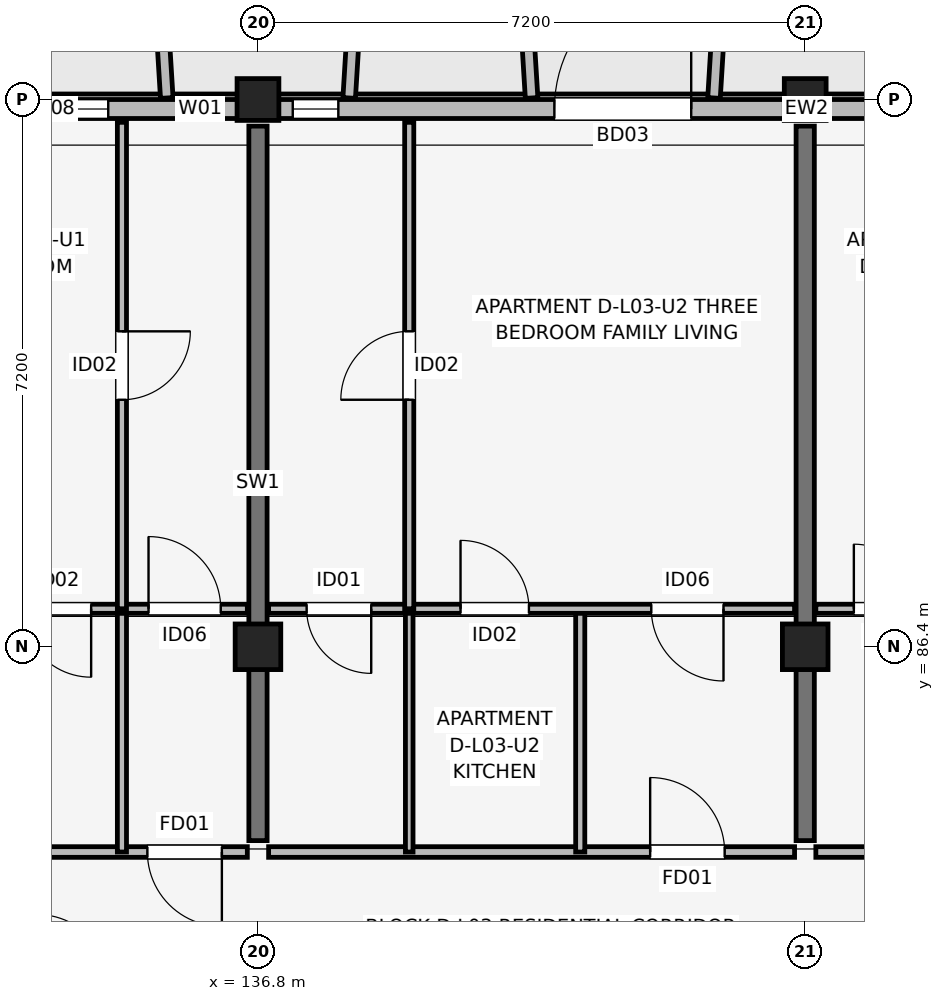
"""IFC4 building model, lengths in metres.
Left out: names, types, materials, properties, quantities, classifications, styles, units other than length and angle.
Written with IfcOpenShell. Run it as: python <this file> out.ifc"""

import sys

from ifc_helpers import new_model, si_unit, direction, frame, frame_2d, origin, origin_2d, place, context, subcontext, project, spatial, rectangle, extrude, element, fill, save


model = new_model("IFC4")
c1 = context("Model", 3, precision=1e-05, world=origin(), true_north=direction((0.0, 1.0)))
c2 = subcontext(c1, "Body", "Model", "MODEL_VIEW")
j1 = project(units=[si_unit("LENGTHUNIT", "METRE"), si_unit("PLANEANGLEUNIT", "RADIAN")], contexts=[c1])
p1 = place(None, origin())
s1 = spatial("IfcSite", under=j1, at=p1, CompositionType="ELEMENT")
p2 = place(p1, origin())
s2 = spatial("IfcBuilding", under=s1, at=p2, CompositionType="ELEMENT")
p3 = place(p2, frame((0.0, 0.0, 11.85)))
s3 = spatial("IfcBuildingStorey", under=s2, at=p3, CompositionType="ELEMENT", Elevation=11.85)
p4 = place(p3, frame((136.8, 86.4, 0.0), z_axis=(0.0, 0.0, 1.0), x_axis=(1.0, 0.0, 0.0)))
e1 = element("IfcColumn", 1, at=p4, inside=s3, PredefinedType="COLUMN", context=c2, shape_type="SweptSolid", body=[
    extrude(rectangle(XDim=0.6, YDim=0.6, at=origin_2d()), origin(), (0.0, 0.0, 1.0), 3.15),
])
p5 = place(p3, frame((136.8, 93.6, 0.0), z_axis=(0.0, 0.0, 1.0), x_axis=(1.0, 0.0, 0.0)))
e2 = element("IfcColumn", 2, at=p5, inside=s3, PredefinedType="COLUMN", context=c2, shape_type="SweptSolid", body=[
    extrude(rectangle(XDim=0.55, YDim=0.55, at=origin_2d()), origin(), (0.0, 0.0, 1.0), 3.15),
])
p6 = place(p3, frame((144.0, 86.4, 0.0), z_axis=(0.0, 0.0, 1.0), x_axis=(1.0, 0.0, 0.0)))
e3 = element("IfcColumn", 3, at=p6, inside=s3, PredefinedType="COLUMN", context=c2, shape_type="SweptSolid", body=[
    extrude(rectangle(XDim=0.6, YDim=0.6, at=origin_2d()), origin(), (0.0, 0.0, 1.0), 3.15),
])
p7 = place(p3, frame((144.0, 93.6, 0.0), z_axis=(0.0, 0.0, 1.0), x_axis=(1.0, 0.0, 0.0)))
e4 = element("IfcColumn", 4, at=p7, inside=s3, PredefinedType="COLUMN", context=c2, shape_type="SweptSolid", body=[
    extrude(rectangle(XDim=0.55, YDim=0.55, at=origin_2d()), origin(), (0.0, 0.0, 1.0), 3.15),
])
for number, where, z_axis, x_axis in (
    (5, (136.8, 83.85, 0.0), (0.0, 0.0, 1.0), (0.0, 1.0, 0.0)),
    (6, (144.0, 83.85, 0.0), (0.0, 0.0, 1.0), (0.0, 1.0, 0.0)),
):
    element("IfcWall", number, at=place(p3, frame(where, z_axis=z_axis, x_axis=x_axis)), inside=s3, PredefinedType="SHEAR", context=c2, shape_type="SweptSolid", body=[
        extrude(rectangle(XDim=9.4, YDim=0.24, at=frame_2d((4.7, 0.0))), origin(), (0.0, 0.0, 1.0), 3.15),
    ])
p8 = place(p3, frame((162.8, 93.475, 0.0), z_axis=(0.0, 0.0, 1.0), x_axis=(-1.0, 0.0, 0.0)))
e7 = element("IfcWall", 7, at=p8, inside=s3, PredefinedType="SOLIDWALL", context=c2, shape_type="SweptSolid", body=[
    extrude(rectangle(XDim=30.4, YDim=0.25, at=frame_2d((15.2, 0.0))), origin(), (0.0, 0.0, 1.0), 2.43),
])
p9 = place(p8, frame((22.1, 0.0, 0.0), z_axis=(0.0, 0.0, 1.0), x_axis=(-1.0, 0.0, 0.0)))
e8 = element("IfcOpeningElement", 8, at=p9, cuts=e7, PredefinedType="OPENING", context=c2, shape_type="SweptSolid", body=[
    extrude(rectangle(XDim=1.8, YDim=2.15, at=frame_2d((0.9, 1.075))), frame((0.0, 0.135, 0.0), z_axis=(0.0, -1.0, 0.0), x_axis=(1.0, 0.0, 0.0)), (0.0, 0.0, 1.0), 0.27),
])
p10 = place(p8, frame((7.625, 0.0, 0.0), z_axis=(0.0, 0.0, 1.0), x_axis=(-1.0, 0.0, 0.0)))
e9 = element("IfcOpeningElement", 9, at=p10, cuts=e7, PredefinedType="OPENING", context=c2, shape_type="SweptSolid", body=[
    extrude(rectangle(XDim=1.65, YDim=2.15, at=frame_2d((0.825, 1.075))), frame((0.0, 0.135, 0.0), z_axis=(0.0, -1.0, 0.0), x_axis=(1.0, 0.0, 0.0)), (0.0, 0.0, 1.0), 0.27),
])
p11 = place(p8, frame((27.97, 0.0, 0.7)))
e10 = element("IfcOpeningElement", 10, at=p11, cuts=e7, PredefinedType="OPENING", context=c2, shape_type="SweptSolid", body=[
    extrude(rectangle(XDim=1.46, YDim=1.55, at=frame_2d((0.73, 0.775))), frame((0.0, 0.135, 0.0), z_axis=(0.0, -1.0, 0.0), x_axis=(1.0, 0.0, 0.0)), (0.0, 0.0, 1.0), 0.27),
])
p12 = place(p8, frame((26.458, 0.0, 0.75)))
e11 = element("IfcOpeningElement", 11, at=p12, cuts=e7, PredefinedType="OPENING", context=c2, shape_type="SweptSolid", body=[
    extrude(rectangle(XDim=0.6, YDim=1.25, at=frame_2d((0.3, 0.625))), frame((0.0, 0.135, 0.0), z_axis=(0.0, -1.0, 0.0), x_axis=(1.0, 0.0, 0.0)), (0.0, 0.0, 1.0), 0.27),
])
p13 = place(p8, frame((24.942, 0.0, 0.75)))
e12 = element("IfcOpeningElement", 12, at=p13, cuts=e7, PredefinedType="OPENING", context=c2, shape_type="SweptSolid", body=[
    extrude(rectangle(XDim=0.6, YDim=1.25, at=frame_2d((0.3, 0.625))), frame((0.0, 0.135, 0.0), z_axis=(0.0, -1.0, 0.0), x_axis=(1.0, 0.0, 0.0)), (0.0, 0.0, 1.0), 0.27),
])
p14 = place(p8, frame((15.54, 0.0, 0.7)))
e13 = element("IfcOpeningElement", 13, at=p14, cuts=e7, PredefinedType="OPENING", context=c2, shape_type="SweptSolid", body=[
    extrude(rectangle(XDim=1.72, YDim=1.6, at=frame_2d((0.86, 0.8))), frame((0.0, 0.135, 0.0), z_axis=(0.0, -1.0, 0.0), x_axis=(1.0, 0.0, 0.0)), (0.0, 0.0, 1.0), 0.27),
])
p15 = place(p8, frame((13.465, 0.0, 0.75)))
e14 = element("IfcOpeningElement", 14, at=p15, cuts=e7, PredefinedType="OPENING", context=c2, shape_type="SweptSolid", body=[
    extrude(rectangle(XDim=0.72, YDim=1.35, at=frame_2d((0.36, 0.675))), frame((0.0, 0.135, 0.0), z_axis=(0.0, -1.0, 0.0), x_axis=(1.0, 0.0, 0.0)), (0.0, 0.0, 1.0), 0.27),
])
p16 = place(p8, frame((10.542, 0.0, 0.75)))
e15 = element("IfcOpeningElement", 15, at=p16, cuts=e7, PredefinedType="OPENING", context=c2, shape_type="SweptSolid", body=[
    extrude(rectangle(XDim=0.6, YDim=1.25, at=frame_2d((0.3, 0.625))), frame((0.0, 0.135, 0.0), z_axis=(0.0, -1.0, 0.0), x_axis=(1.0, 0.0, 0.0)), (0.0, 0.0, 1.0), 0.27),
])
p17 = place(p8, frame((3.343, 0.0, 0.75)))
e16 = element("IfcOpeningElement", 16, at=p17, cuts=e7, PredefinedType="OPENING", context=c2, shape_type="SweptSolid", body=[
    extrude(rectangle(XDim=0.6, YDim=1.25, at=frame_2d((0.3, 0.625))), frame((0.0, 0.135, 0.0), z_axis=(0.0, -1.0, 0.0), x_axis=(1.0, 0.0, 0.0)), (0.0, 0.0, 1.0), 0.27),
])
p18 = place(p8, frame((1.02, 0.0, 0.75)))
e17 = element("IfcOpeningElement", 17, at=p18, cuts=e7, PredefinedType="OPENING", context=c2, shape_type="SweptSolid", body=[
    extrude(rectangle(XDim=1.1, YDim=1.5, at=frame_2d((0.55, 0.75))), frame((0.0, 0.135, 0.0), z_axis=(0.0, -1.0, 0.0), x_axis=(1.0, 0.0, 0.0)), (0.0, 0.0, 1.0), 0.27),
])
p19 = place(p3, frame((135.6, 93.62, 0.0), z_axis=(0.0, 0.0, 1.0), x_axis=(-0.061170732449, 0.998127317276, 0.0)))
e18 = element("IfcWall", 18, at=p19, inside=s3, PredefinedType="ELEMENTEDWALL", context=c2, shape_type="SweptSolid", body=[
    extrude(rectangle(XDim=1.964, YDim=0.165, at=frame_2d((0.982, 0.0))), origin(), (0.0, 0.0, 1.0), 2.95),
])
for number, where, z_axis, x_axis in (
    (19, (138.0, 93.62, 0.0), (0.0, 0.0, 1.0), (0.061, 0.998, 0.0)),
    (20, (140.4, 93.62, 0.0), (0.0, 0.0, 1.0), (-0.061, 0.998, 0.0)),
    (21, (142.8, 93.62, 0.0), (0.0, 0.0, 1.0), (0.061, 0.998, 0.0)),
):
    element("IfcWall", number, at=place(p3, frame(where, z_axis=z_axis, x_axis=x_axis)), inside=s3, PredefinedType="ELEMENTEDWALL", context=c2, shape_type="SweptSolid", body=[
        extrude(rectangle(XDim=1.964, YDim=0.165, at=frame_2d((0.982, 0.0))), origin(), (0.0, 0.0, 1.0), 2.48),
    ])
p20 = place(p3, frame((129.74, 83.7, 0.0), z_axis=(0.0, 0.0, 1.0), x_axis=(1.0, 0.0, 0.0)))
e22 = element("IfcWall", 22, at=p20, inside=s3, PredefinedType="PARTITIONING", context=c2, shape_type="SweptSolid", body=[
    extrude(rectangle(XDim=6.92, YDim=0.14, at=frame_2d((3.46, 0.0))), origin(), (0.0, 0.0, 1.0), 2.38),
])
p21 = place(p20, frame((6.585, 0.0, 0.0), z_axis=(0.0, 0.0, 1.0), x_axis=(-1.0, 0.0, 0.0)))
e23 = element("IfcOpeningElement", 23, at=p21, cuts=e22, PredefinedType="OPENING", context=c2, shape_type="SweptSolid", body=[
    extrude(rectangle(XDim=0.98, YDim=2.1, at=frame_2d((0.49, 1.05))), frame((0.0, 0.08, 0.0), z_axis=(0.0, -1.0, 0.0), x_axis=(1.0, 0.0, 0.0)), (0.0, 0.0, 1.0), 0.16),
])
p22 = place(p3, frame((135.01, 83.7, 0.0), z_axis=(0.0, 0.0, 1.0), x_axis=(0.0, 1.0, 0.0)))
e24 = element("IfcWall", 24, at=p22, inside=s3, PredefinedType="PARTITIONING", context=c2, shape_type="SweptSolid", body=[
    extrude(rectangle(XDim=3.2, YDim=0.12, at=frame_2d((1.6, 0.0))), origin(), (0.0, 0.0, 1.0), 2.375),
])
p23 = place(p3, frame((129.74, 86.9, 0.0), z_axis=(0.0, 0.0, 1.0), x_axis=(1.0, 0.0, 0.0)))
e25 = element("IfcWall", 25, at=p23, inside=s3, PredefinedType="PARTITIONING", context=c2, shape_type="SweptSolid", body=[
    extrude(rectangle(XDim=6.92, YDim=0.12, at=frame_2d((3.46, 0.0))), origin(), (0.0, 0.0, 1.0), 2.38),
])
p24 = place(p23, frame((2.21, 0.0, 0.0)))
e26 = element("IfcOpeningElement", 26, at=p24, cuts=e25, PredefinedType="OPENING", context=c2, shape_type="SweptSolid", body=[
    extrude(rectangle(XDim=0.85, YDim=2.08, at=frame_2d((0.425, 1.04))), frame((0.0, 0.07, 0.0), z_axis=(0.0, -1.0, 0.0), x_axis=(1.0, 0.0, 0.0)), (0.0, 0.0, 1.0), 0.14),
])
p25 = place(p23, frame((4.865, 0.0, 0.0), z_axis=(0.0, 0.0, 1.0), x_axis=(-1.0, 0.0, 0.0)))
e27 = element("IfcOpeningElement", 27, at=p25, cuts=e25, PredefinedType="OPENING", context=c2, shape_type="SweptSolid", body=[
    extrude(rectangle(XDim=0.9, YDim=2.08, at=frame_2d((0.45, 1.04))), frame((0.0, 0.07, 0.0), z_axis=(0.0, -1.0, 0.0), x_axis=(1.0, 0.0, 0.0)), (0.0, 0.0, 1.0), 0.14),
])
p26 = place(p23, frame((5.62, 0.0, 0.0)))
e28 = element("IfcOpeningElement", 28, at=p26, cuts=e25, PredefinedType="OPENING", context=c2, shape_type="SweptSolid", body=[
    extrude(rectangle(XDim=0.95, YDim=2.08, at=frame_2d((0.475, 1.04))), frame((0.0, 0.07, 0.0), z_axis=(0.0, -1.0, 0.0), x_axis=(1.0, 0.0, 0.0)), (0.0, 0.0, 1.0), 0.14),
])
p27 = place(p3, frame((135.01, 86.9, 0.0), z_axis=(0.0, 0.0, 1.0), x_axis=(0.0, 1.0, 0.0)))
e29 = element("IfcWall", 29, at=p27, inside=s3, PredefinedType="PARTITIONING", context=c2, shape_type="SweptSolid", body=[
    extrude(rectangle(XDim=6.4, YDim=0.12, at=frame_2d((3.2, 0.0))), origin(), (0.0, 0.0, 1.0), 2.38),
])
p28 = place(p27, frame((3.65, 0.0, 0.0), z_axis=(0.0, 0.0, 1.0), x_axis=(-1.0, 0.0, 0.0)))
e30 = element("IfcOpeningElement", 30, at=p28, cuts=e29, PredefinedType="OPENING", context=c2, shape_type="SweptSolid", body=[
    extrude(rectangle(XDim=0.9, YDim=2.08, at=frame_2d((0.45, 1.04))), frame((0.0, 0.07, 0.0), z_axis=(0.0, -1.0, 0.0), x_axis=(1.0, 0.0, 0.0)), (0.0, 0.0, 1.0), 0.14),
])
p29 = place(p3, frame((136.94, 83.7, 0.0), z_axis=(0.0, 0.0, 1.0), x_axis=(1.0, 0.0, 0.0)))
e31 = element("IfcWall", 31, at=p29, inside=s3, PredefinedType="PARTITIONING", context=c2, shape_type="SweptSolid", body=[
    extrude(rectangle(XDim=6.92, YDim=0.14, at=frame_2d((3.46, 0.0))), origin(), (0.0, 0.0, 1.0), 2.38),
])
p30 = place(p29, frame((5.02, 0.0, 0.0)))
e32 = element("IfcOpeningElement", 32, at=p30, cuts=e31, PredefinedType="OPENING", context=c2, shape_type="SweptSolid", body=[
    extrude(rectangle(XDim=0.98, YDim=2.1, at=frame_2d((0.49, 1.05))), frame((0.0, 0.08, 0.0), z_axis=(0.0, -1.0, 0.0), x_axis=(1.0, 0.0, 0.0)), (0.0, 0.0, 1.0), 0.16),
])
p31 = place(p3, frame((138.79, 83.7, 0.0), z_axis=(0.0, 0.0, 1.0), x_axis=(0.0, 1.0, 0.0)))
e33 = element("IfcWall", 33, at=p31, inside=s3, PredefinedType="PARTITIONING", context=c2, shape_type="SweptSolid", body=[
    extrude(rectangle(XDim=3.2, YDim=0.1, at=frame_2d((1.6, 0.0))), origin(), (0.0, 0.0, 1.0), 2.375),
])
p32 = place(p3, frame((141.04, 83.7, 0.0), z_axis=(0.0, 0.0, 1.0), x_axis=(0.0, 1.0, 0.0)))
e34 = element("IfcWall", 34, at=p32, inside=s3, PredefinedType="PARTITIONING", context=c2, shape_type="SweptSolid", body=[
    extrude(rectangle(XDim=3.2, YDim=0.12, at=frame_2d((1.6, 0.0))), origin(), (0.0, 0.0, 1.0), 2.375),
])
p33 = place(p3, frame((136.94, 86.9, 0.0), z_axis=(0.0, 0.0, 1.0), x_axis=(1.0, 0.0, 0.0)))
e35 = element("IfcWall", 35, at=p33, inside=s3, PredefinedType="PARTITIONING", context=c2, shape_type="SweptSolid", body=[
    extrude(rectangle(XDim=6.92, YDim=0.12, at=frame_2d((3.46, 0.0))), origin(), (0.0, 0.0, 1.0), 2.38),
])
p34 = place(p33, frame((1.35, 0.0, 0.0), z_axis=(0.0, 0.0, 1.0), x_axis=(-1.0, 0.0, 0.0)))
e36 = element("IfcOpeningElement", 36, at=p34, cuts=e35, PredefinedType="OPENING", context=c2, shape_type="SweptSolid", body=[
    extrude(rectangle(XDim=0.85, YDim=2.08, at=frame_2d((0.425, 1.04))), frame((0.0, 0.07, 0.0), z_axis=(0.0, -1.0, 0.0), x_axis=(1.0, 0.0, 0.0)), (0.0, 0.0, 1.0), 0.14),
])
p35 = place(p33, frame((2.525, 0.0, 0.0)))
e37 = element("IfcOpeningElement", 37, at=p35, cuts=e35, PredefinedType="OPENING", context=c2, shape_type="SweptSolid", body=[
    extrude(rectangle(XDim=0.9, YDim=2.08, at=frame_2d((0.45, 1.04))), frame((0.0, 0.07, 0.0), z_axis=(0.0, -1.0, 0.0), x_axis=(1.0, 0.0, 0.0)), (0.0, 0.0, 1.0), 0.14),
])
p36 = place(p33, frame((5.985, 0.0, 0.0), z_axis=(0.0, 0.0, 1.0), x_axis=(-1.0, 0.0, 0.0)))
e38 = element("IfcOpeningElement", 38, at=p36, cuts=e35, PredefinedType="OPENING", context=c2, shape_type="SweptSolid", body=[
    extrude(rectangle(XDim=0.95, YDim=2.08, at=frame_2d((0.475, 1.04))), frame((0.0, 0.07, 0.0), z_axis=(0.0, -1.0, 0.0), x_axis=(1.0, 0.0, 0.0)), (0.0, 0.0, 1.0), 0.14),
])
p37 = place(p3, frame((138.79, 86.9, 0.0), z_axis=(0.0, 0.0, 1.0), x_axis=(0.0, 1.0, 0.0)))
e39 = element("IfcWall", 39, at=p37, inside=s3, PredefinedType="PARTITIONING", context=c2, shape_type="SweptSolid", body=[
    extrude(rectangle(XDim=6.4, YDim=0.12, at=frame_2d((3.2, 0.0))), origin(), (0.0, 0.0, 1.0), 2.38),
])
p38 = place(p37, frame((2.75, 0.0, 0.0)))
e40 = element("IfcOpeningElement", 40, at=p38, cuts=e39, PredefinedType="OPENING", context=c2, shape_type="SweptSolid", body=[
    extrude(rectangle(XDim=0.9, YDim=2.08, at=frame_2d((0.45, 1.04))), frame((0.0, 0.07, 0.0), z_axis=(0.0, -1.0, 0.0), x_axis=(1.0, 0.0, 0.0)), (0.0, 0.0, 1.0), 0.14),
])
p39 = place(p3, frame((144.14, 83.7, 0.0), z_axis=(0.0, 0.0, 1.0), x_axis=(1.0, 0.0, 0.0)))
e41 = element("IfcWall", 41, at=p39, inside=s3, PredefinedType="PARTITIONING", context=c2, shape_type="SweptSolid", body=[
    extrude(rectangle(XDim=6.92, YDim=0.14, at=frame_2d((3.46, 0.0))), origin(), (0.0, 0.0, 1.0), 2.38),
])
p40 = place(p39, frame((5.85, 0.0, 0.0), z_axis=(0.0, 0.0, 1.0), x_axis=(-1.0, 0.0, 0.0)))
e42 = element("IfcOpeningElement", 42, at=p40, cuts=e41, PredefinedType="OPENING", context=c2, shape_type="SweptSolid", body=[
    extrude(rectangle(XDim=0.98, YDim=2.1, at=frame_2d((0.49, 1.05))), frame((0.0, 0.08, 0.0), z_axis=(0.0, -1.0, 0.0), x_axis=(1.0, 0.0, 0.0)), (0.0, 0.0, 1.0), 0.16),
])
p41 = place(p3, frame((144.14, 86.9, 0.0), z_axis=(0.0, 0.0, 1.0), x_axis=(1.0, 0.0, 0.0)))
e43 = element("IfcWall", 43, at=p41, inside=s3, PredefinedType="PARTITIONING", context=c2, shape_type="SweptSolid", body=[
    extrude(rectangle(XDim=6.92, YDim=0.12, at=frame_2d((3.46, 0.0))), origin(), (0.0, 0.0, 1.0), 2.38),
])
p42 = place(p41, frame((0.5, 0.0, 0.0)))
e44 = element("IfcOpeningElement", 44, at=p42, cuts=e43, PredefinedType="OPENING", context=c2, shape_type="SweptSolid", body=[
    extrude(rectangle(XDim=0.85, YDim=2.08, at=frame_2d((0.425, 1.04))), frame((0.0, 0.07, 0.0), z_axis=(0.0, -1.0, 0.0), x_axis=(1.0, 0.0, 0.0)), (0.0, 0.0, 1.0), 0.14),
])
p43 = place(p41, frame((3.275, 0.0, 0.0), z_axis=(0.0, 0.0, 1.0), x_axis=(-1.0, 0.0, 0.0)))
e45 = element("IfcOpeningElement", 45, at=p43, cuts=e43, PredefinedType="OPENING", context=c2, shape_type="SweptSolid", body=[
    extrude(rectangle(XDim=0.9, YDim=2.08, at=frame_2d((0.45, 1.04))), frame((0.0, 0.07, 0.0), z_axis=(0.0, -1.0, 0.0), x_axis=(1.0, 0.0, 0.0)), (0.0, 0.0, 1.0), 0.14),
])
p44 = place(p41, frame((4.885, 0.0, 0.0)))
e46 = element("IfcOpeningElement", 46, at=p44, cuts=e43, PredefinedType="OPENING", context=c2, shape_type="SweptSolid", body=[
    extrude(rectangle(XDim=0.95, YDim=2.08, at=frame_2d((0.475, 1.04))), frame((0.0, 0.07, 0.0), z_axis=(0.0, -1.0, 0.0), x_axis=(1.0, 0.0, 0.0)), (0.0, 0.0, 1.0), 0.14),
])
p45 = place(p9, origin())
e47 = element("IfcDoor", 47, at=p45, inside=s3, OperationType="SINGLE_SWING_LEFT", PredefinedType="DOOR", context=c2, shape_type="SweptSolid", body=[
    extrude(rectangle(XDim=1.8, YDim=2.15, at=frame_2d((0.9, 1.075))), frame((0.0, 0.025, 0.0), z_axis=(0.0, -1.0, 0.0), x_axis=(1.0, 0.0, 0.0)), (0.0, 0.0, 1.0), 0.05),
])
fill(e8, e47)
p46 = place(p11, origin())
e48 = element("IfcWindow", 48, at=p46, inside=s3, PartitioningType="SINGLE_PANEL", PredefinedType="WINDOW", context=c2, shape_type="SweptSolid", body=[
    extrude(rectangle(XDim=1.46, YDim=1.55, at=frame_2d((0.73, 0.775))), frame((0.0, 0.03, 0.0), z_axis=(0.0, -1.0, 0.0), x_axis=(1.0, 0.0, 0.0)), (0.0, 0.0, 1.0), 0.06),
])
fill(e10, e48)
p47 = place(p12, origin())
e49 = element("IfcWindow", 49, at=p47, inside=s3, PartitioningType="SINGLE_PANEL", PredefinedType="WINDOW", context=c2, shape_type="SweptSolid", body=[
    extrude(rectangle(XDim=0.6, YDim=1.25, at=frame_2d((0.3, 0.625))), frame((0.0, 0.03, 0.0), z_axis=(0.0, -1.0, 0.0), x_axis=(1.0, 0.0, 0.0)), (0.0, 0.0, 1.0), 0.06),
])
fill(e11, e49)
p48 = place(p13, origin())
e50 = element("IfcWindow", 50, at=p48, inside=s3, PartitioningType="SINGLE_PANEL", PredefinedType="WINDOW", context=c2, shape_type="SweptSolid", body=[
    extrude(rectangle(XDim=0.6, YDim=1.25, at=frame_2d((0.3, 0.625))), frame((0.0, 0.03, 0.0), z_axis=(0.0, -1.0, 0.0), x_axis=(1.0, 0.0, 0.0)), (0.0, 0.0, 1.0), 0.06),
])
fill(e12, e50)
p49 = place(p21, origin())
e51 = element("IfcDoor", 51, at=p49, inside=s3, OperationType="SINGLE_SWING_RIGHT", PredefinedType="DOOR", context=c2, shape_type="SweptSolid", body=[
    extrude(rectangle(XDim=0.98, YDim=2.1, at=frame_2d((0.49, 1.05))), frame((0.0, 0.025, 0.0), z_axis=(0.0, -1.0, 0.0), x_axis=(1.0, 0.0, 0.0)), (0.0, 0.0, 1.0), 0.05),
])
fill(e23, e51)
p50 = place(p25, origin())
e52 = element("IfcDoor", 52, at=p50, inside=s3, OperationType="SINGLE_SWING_RIGHT", PredefinedType="DOOR", context=c2, shape_type="SweptSolid", body=[
    extrude(rectangle(XDim=0.9, YDim=2.08, at=frame_2d((0.45, 1.04))), frame((0.0, 0.025, 0.0), z_axis=(0.0, -1.0, 0.0), x_axis=(1.0, 0.0, 0.0)), (0.0, 0.0, 1.0), 0.05),
])
fill(e27, e52)
p51 = place(p26, origin())
e53 = element("IfcDoor", 53, at=p51, inside=s3, OperationType="SINGLE_SWING_LEFT", PredefinedType="DOOR", context=c2, shape_type="SweptSolid", body=[
    extrude(rectangle(XDim=0.95, YDim=2.08, at=frame_2d((0.475, 1.04))), frame((0.0, 0.025, 0.0), z_axis=(0.0, -1.0, 0.0), x_axis=(1.0, 0.0, 0.0)), (0.0, 0.0, 1.0), 0.05),
])
fill(e28, e53)
p52 = place(p28, origin())
e54 = element("IfcDoor", 54, at=p52, inside=s3, OperationType="SINGLE_SWING_RIGHT", PredefinedType="DOOR", context=c2, shape_type="SweptSolid", body=[
    extrude(rectangle(XDim=0.9, YDim=2.08, at=frame_2d((0.45, 1.04))), frame((0.0, 0.025, 0.0), z_axis=(0.0, -1.0, 0.0), x_axis=(1.0, 0.0, 0.0)), (0.0, 0.0, 1.0), 0.05),
])
fill(e30, e54)
p53 = place(p30, origin())
e55 = element("IfcDoor", 55, at=p53, inside=s3, OperationType="SINGLE_SWING_LEFT", PredefinedType="DOOR", context=c2, shape_type="SweptSolid", body=[
    extrude(rectangle(XDim=0.98, YDim=2.1, at=frame_2d((0.49, 1.05))), frame((0.0, 0.025, 0.0), z_axis=(0.0, -1.0, 0.0), x_axis=(1.0, 0.0, 0.0)), (0.0, 0.0, 1.0), 0.05),
])
fill(e32, e55)
p54 = place(p34, origin())
e56 = element("IfcDoor", 56, at=p54, inside=s3, OperationType="SINGLE_SWING_RIGHT", PredefinedType="DOOR", context=c2, shape_type="SweptSolid", body=[
    extrude(rectangle(XDim=0.85, YDim=2.08, at=frame_2d((0.425, 1.04))), frame((0.0, 0.025, 0.0), z_axis=(0.0, -1.0, 0.0), x_axis=(1.0, 0.0, 0.0)), (0.0, 0.0, 1.0), 0.05),
])
fill(e36, e56)
p55 = place(p35, origin())
e57 = element("IfcDoor", 57, at=p55, inside=s3, OperationType="SINGLE_SWING_LEFT", PredefinedType="DOOR", context=c2, shape_type="SweptSolid", body=[
    extrude(rectangle(XDim=0.9, YDim=2.08, at=frame_2d((0.45, 1.04))), frame((0.0, 0.025, 0.0), z_axis=(0.0, -1.0, 0.0), x_axis=(1.0, 0.0, 0.0)), (0.0, 0.0, 1.0), 0.05),
])
fill(e37, e57)
p56 = place(p36, origin())
e58 = element("IfcDoor", 58, at=p56, inside=s3, OperationType="SINGLE_SWING_RIGHT", PredefinedType="DOOR", context=c2, shape_type="SweptSolid", body=[
    extrude(rectangle(XDim=0.95, YDim=2.08, at=frame_2d((0.475, 1.04))), frame((0.0, 0.025, 0.0), z_axis=(0.0, -1.0, 0.0), x_axis=(1.0, 0.0, 0.0)), (0.0, 0.0, 1.0), 0.05),
])
fill(e38, e58)
p57 = place(p38, origin())
e59 = element("IfcDoor", 59, at=p57, inside=s3, OperationType="SINGLE_SWING_LEFT", PredefinedType="DOOR", context=c2, shape_type="SweptSolid", body=[
    extrude(rectangle(XDim=0.9, YDim=2.08, at=frame_2d((0.45, 1.04))), frame((0.0, 0.025, 0.0), z_axis=(0.0, -1.0, 0.0), x_axis=(1.0, 0.0, 0.0)), (0.0, 0.0, 1.0), 0.05),
])
fill(e40, e59)
p58 = place(p42, origin())
e60 = element("IfcDoor", 60, at=p58, inside=s3, OperationType="SINGLE_SWING_LEFT", PredefinedType="DOOR", context=c2, shape_type="SweptSolid", body=[
    extrude(rectangle(XDim=0.85, YDim=2.08, at=frame_2d((0.425, 1.04))), frame((0.0, 0.025, 0.0), z_axis=(0.0, -1.0, 0.0), x_axis=(1.0, 0.0, 0.0)), (0.0, 0.0, 1.0), 0.05),
])
fill(e44, e60)
save(model, sys.argv[1])
